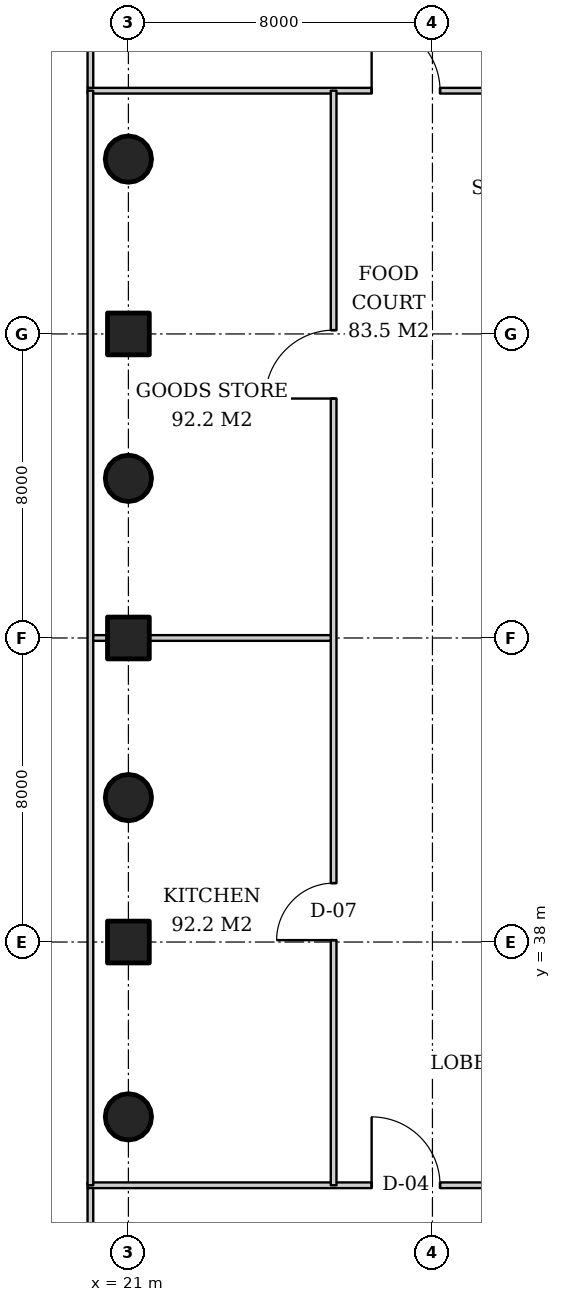
"""IFC4 building model, lengths in metres.
Left out: names, types, materials, properties, quantities, classifications, styles, units other than length and angle.
Written with IfcOpenShell. Run it as: python <this file> out.ifc"""

import sys

from ifc_helpers import new_model, si_unit, direction, frame, frame_2d, origin, origin_2d, place, context, subcontext, project, spatial, rectangle, hollow_circle, extrude, element, fill, save


model = new_model("IFC4")
c1 = context("Model", 3, precision=1e-05, world=origin(), true_north=direction((0.0, 1.0)))
c2 = subcontext(c1, "Body", "Model", "MODEL_VIEW")
j1 = project(units=[si_unit("LENGTHUNIT", "METRE"), si_unit("PLANEANGLEUNIT", "RADIAN")], contexts=[c1])
p1 = place(None, origin())
s1 = spatial("IfcSite", under=j1, at=p1, CompositionType="ELEMENT")
p2 = place(p1, origin())
s2 = spatial("IfcBuilding", under=s1, at=p2, CompositionType="ELEMENT")
p3 = place(p2, frame((0.0, 0.0, 6.0)))
s3 = spatial("IfcBuildingStorey", under=s2, at=p3, CompositionType="ELEMENT", Elevation=6.0)
for number, where, z_axis, x_axis in (
    (1, (21.0, 58.6, 0.0), (0.0, 0.0, 1.0), (1.0, 0.0, 0.0)),
    (2, (21.0, 50.2, 0.0), (0.0, 0.0, 1.0), (1.0, 0.0, 0.0)),
    (3, (21.0, 41.8, 0.0), (0.0, 0.0, 1.0), (1.0, 0.0, 0.0)),
    (4, (21.0, 33.4, 0.0), (0.0, 0.0, 1.0), (1.0, 0.0, 0.0)),
):
    element("IfcColumn", number, at=place(p3, frame(where, z_axis=z_axis, x_axis=x_axis)), inside=s3, PredefinedType="COLUMN", context=c2, shape_type="SweptSolid", body=[
        extrude(hollow_circle(Radius=0.61, WallThickness=0.04, at=origin_2d()), origin(), (0.0, 0.0, 1.0), 5.0),
    ])
for number, where, z_axis, x_axis in (
    (5, (21.0, 38.0, 0.0), (0.0, 0.0, 1.0), (1.0, 0.0, 0.0)),
    (6, (21.0, 46.0, 0.0), (0.0, 0.0, 1.0), (1.0, 0.0, 0.0)),
    (7, (21.0, 54.0, 0.0), (0.0, 0.0, 1.0), (1.0, 0.0, 0.0)),
):
    element("IfcColumn", number, at=place(p3, frame(where, z_axis=z_axis, x_axis=x_axis)), inside=s3, PredefinedType="COLUMN", context=c2, shape_type="SweptSolid", body=[
        extrude(rectangle(XDim=1.1, YDim=1.1, at=origin_2d()), origin(), (0.0, 0.0, 1.0), 5.0),
    ])
p4 = place(p3, frame((19.925, 31.6, 0.0), z_axis=(0.0, 0.0, 1.0), x_axis=(1.0, 0.0, 0.0)))
e8 = element("IfcWall", 8, at=p4, inside=s3, PredefinedType="PARTITIONING", context=c2, shape_type="SweptSolid", body=[
    extrude(rectangle(XDim=50.15, YDim=0.15, at=frame_2d((25.075, 0.0))), origin(), (0.0, 0.0, 1.0), 3.688),
])
p5 = place(p4, frame((7.475, 0.0, 0.0)))
e9 = element("IfcOpeningElement", 9, at=p5, cuts=e8, PredefinedType="OPENING", context=c2, shape_type="SweptSolid", body=[
    extrude(rectangle(XDim=1.8, YDim=2.4, at=frame_2d((0.9, 1.2))), frame((0.0, 0.085, 0.0), z_axis=(0.0, -1.0, 0.0), x_axis=(1.0, 0.0, 0.0)), (0.0, 0.0, 1.0), 0.17),
])
p6 = place(p4, frame((19.975, 0.0, 0.0)))
e10 = element("IfcOpeningElement", 10, at=p6, cuts=e8, PredefinedType="OPENING", context=c2, shape_type="SweptSolid", body=[
    extrude(rectangle(XDim=1.8, YDim=2.4, at=frame_2d((0.9, 1.2))), frame((0.0, 0.085, 0.0), z_axis=(0.0, -1.0, 0.0), x_axis=(1.0, 0.0, 0.0)), (0.0, 0.0, 1.0), 0.17),
])
p7 = place(p4, frame((28.375, 0.0, 0.0)))
e11 = element("IfcOpeningElement", 11, at=p7, cuts=e8, PredefinedType="OPENING", context=c2, shape_type="SweptSolid", body=[
    extrude(rectangle(XDim=1.8, YDim=2.4, at=frame_2d((0.9, 1.2))), frame((0.0, 0.085, 0.0), z_axis=(0.0, -1.0, 0.0), x_axis=(1.0, 0.0, 0.0)), (0.0, 0.0, 1.0), 0.17),
])
p8 = place(p4, frame((40.875, 0.0, 0.0)))
e12 = element("IfcOpeningElement", 12, at=p8, cuts=e8, PredefinedType="OPENING", context=c2, shape_type="SweptSolid", body=[
    extrude(rectangle(XDim=1.8, YDim=2.4, at=frame_2d((0.9, 1.2))), frame((0.0, 0.085, 0.0), z_axis=(0.0, -1.0, 0.0), x_axis=(1.0, 0.0, 0.0)), (0.0, 0.0, 1.0), 0.17),
])
p9 = place(p3, frame((20.0, 21.075, 0.0), z_axis=(0.0, 0.0, 1.0), x_axis=(0.0, 1.0, 0.0)))
e13 = element("IfcWall", 13, at=p9, inside=s3, PredefinedType="PARTITIONING", context=c2, shape_type="SweptSolid", body=[
    extrude(rectangle(XDim=10.45, YDim=0.15, at=frame_2d((5.225, 0.0))), origin(), (0.0, 0.0, 1.0), 3.2),
])
p10 = place(p3, frame((19.925, 60.4, 0.0), z_axis=(0.0, 0.0, 1.0), x_axis=(1.0, 0.0, 0.0)))
e14 = element("IfcWall", 14, at=p10, inside=s3, PredefinedType="PARTITIONING", context=c2, shape_type="SweptSolid", body=[
    extrude(rectangle(XDim=50.15, YDim=0.15, at=frame_2d((25.075, 0.0))), origin(), (0.0, 0.0, 1.0), 3.688),
])
p11 = place(p10, frame((7.475, 0.0, 0.0)))
e15 = element("IfcOpeningElement", 15, at=p11, cuts=e14, PredefinedType="OPENING", context=c2, shape_type="SweptSolid", body=[
    extrude(rectangle(XDim=1.8, YDim=2.4, at=frame_2d((0.9, 1.2))), frame((0.0, 0.085, 0.0), z_axis=(0.0, -1.0, 0.0), x_axis=(1.0, 0.0, 0.0)), (0.0, 0.0, 1.0), 0.17),
])
p12 = place(p10, frame((19.975, 0.0, 0.0)))
e16 = element("IfcOpeningElement", 16, at=p12, cuts=e14, PredefinedType="OPENING", context=c2, shape_type="SweptSolid", body=[
    extrude(rectangle(XDim=1.8, YDim=2.4, at=frame_2d((0.9, 1.2))), frame((0.0, 0.085, 0.0), z_axis=(0.0, -1.0, 0.0), x_axis=(1.0, 0.0, 0.0)), (0.0, 0.0, 1.0), 0.17),
])
p13 = place(p10, frame((28.375, 0.0, 0.0)))
e17 = element("IfcOpeningElement", 17, at=p13, cuts=e14, PredefinedType="OPENING", context=c2, shape_type="SweptSolid", body=[
    extrude(rectangle(XDim=1.8, YDim=2.4, at=frame_2d((0.9, 1.2))), frame((0.0, 0.085, 0.0), z_axis=(0.0, -1.0, 0.0), x_axis=(1.0, 0.0, 0.0)), (0.0, 0.0, 1.0), 0.17),
])
p14 = place(p10, frame((40.875, 0.0, 0.0)))
e18 = element("IfcOpeningElement", 18, at=p14, cuts=e14, PredefinedType="OPENING", context=c2, shape_type="SweptSolid", body=[
    extrude(rectangle(XDim=1.8, YDim=2.4, at=frame_2d((0.9, 1.2))), frame((0.0, 0.085, 0.0), z_axis=(0.0, -1.0, 0.0), x_axis=(1.0, 0.0, 0.0)), (0.0, 0.0, 1.0), 0.17),
])
p15 = place(p3, frame((20.0, 60.475, 0.0), z_axis=(0.0, 0.0, 1.0), x_axis=(0.0, 1.0, 0.0)))
e19 = element("IfcWall", 19, at=p15, inside=s3, PredefinedType="PARTITIONING", context=c2, shape_type="SweptSolid", body=[
    extrude(rectangle(XDim=10.45, YDim=0.15, at=frame_2d((5.225, 0.0))), origin(), (0.0, 0.0, 1.0), 4.7),
])
p16 = place(p3, frame((20.0, 31.6, 0.0), z_axis=(0.0, 0.0, 1.0), x_axis=(0.0, 1.0, 0.0)))
e20 = element("IfcWall", 20, at=p16, inside=s3, PredefinedType="PARTITIONING", context=c2, shape_type="SweptSolid", body=[
    extrude(rectangle(XDim=28.8, YDim=0.15, at=frame_2d((14.4, 0.0))), origin(), (0.0, 0.0, 1.0), 3.2),
])
p17 = place(p3, frame((26.4, 31.6, 0.0), z_axis=(0.0, 0.0, 1.0), x_axis=(0.0, 1.0, 0.0)))
e21 = element("IfcWall", 21, at=p17, inside=s3, PredefinedType="PARTITIONING", context=c2, shape_type="SweptSolid", body=[
    extrude(rectangle(XDim=28.8, YDim=0.15, at=frame_2d((14.4, 0.0))), origin(), (0.0, 0.0, 1.0), 3.688),
])
p18 = place(p17, frame((6.45, 0.0, 0.0)))
e22 = element("IfcOpeningElement", 22, at=p18, cuts=e21, PredefinedType="OPENING", context=c2, shape_type="SweptSolid", body=[
    extrude(rectangle(XDim=1.5, YDim=2.1, at=frame_2d((0.75, 1.05))), frame((0.0, 0.085, 0.0), z_axis=(0.0, -1.0, 0.0), x_axis=(1.0, 0.0, 0.0)), (0.0, 0.0, 1.0), 0.17),
])
p19 = place(p17, frame((20.7, 0.0, 0.0)))
e23 = element("IfcOpeningElement", 23, at=p19, cuts=e21, PredefinedType="OPENING", context=c2, shape_type="SweptSolid", body=[
    extrude(rectangle(XDim=1.8, YDim=2.4, at=frame_2d((0.9, 1.2))), frame((0.0, 0.085, 0.0), z_axis=(0.0, -1.0, 0.0), x_axis=(1.0, 0.0, 0.0)), (0.0, 0.0, 1.0), 0.17),
])
p20 = place(p3, frame((20.075, 46.0, 0.0), z_axis=(0.0, 0.0, 1.0), x_axis=(1.0, 0.0, 0.0)))
e24 = element("IfcWall", 24, at=p20, inside=s3, PredefinedType="PARTITIONING", context=c2, shape_type="SweptSolid", body=[
    extrude(rectangle(XDim=0.375, YDim=0.15, at=frame_2d((0.188, 0.0))), origin(), (0.0, 0.0, 1.0), 3.2),
])
p21 = place(p3, frame((21.55, 46.0, 0.0), z_axis=(0.0, 0.0, 1.0), x_axis=(1.0, 0.0, 0.0)))
e25 = element("IfcWall", 25, at=p21, inside=s3, PredefinedType="PARTITIONING", context=c2, shape_type="SweptSolid", body=[
    extrude(rectangle(XDim=4.775, YDim=0.15, at=frame_2d((2.387, 0.0))), origin(), (0.0, 0.0, 1.0), 4.7),
])
p22 = place(p5, origin())
e26 = element("IfcDoor", 26, at=p22, inside=s3, OperationType="DOUBLE_DOOR_SINGLE_SWING", PredefinedType="DOOR", context=c2, shape_type="SweptSolid", body=[
    extrude(rectangle(XDim=1.8, YDim=2.4, at=frame_2d((0.9, 1.2))), frame((0.0, 0.025, 0.0), z_axis=(0.0, -1.0, 0.0), x_axis=(1.0, 0.0, 0.0)), (0.0, 0.0, 1.0), 0.05),
])
fill(e9, e26)
p23 = place(p11, origin())
e27 = element("IfcDoor", 27, at=p23, inside=s3, OperationType="DOUBLE_DOOR_SINGLE_SWING", PredefinedType="DOOR", context=c2, shape_type="SweptSolid", body=[
    extrude(rectangle(XDim=1.8, YDim=2.4, at=frame_2d((0.9, 1.2))), frame((0.0, 0.025, 0.0), z_axis=(0.0, -1.0, 0.0), x_axis=(1.0, 0.0, 0.0)), (0.0, 0.0, 1.0), 0.05),
])
fill(e15, e27)
p24 = place(p18, origin())
e28 = element("IfcDoor", 28, at=p24, inside=s3, OperationType="DOUBLE_DOOR_DOUBLE_SWING", PredefinedType="DOOR", context=c2, shape_type="SweptSolid", body=[
    extrude(rectangle(XDim=1.5, YDim=2.1, at=frame_2d((0.75, 1.05))), frame((0.0, 0.025, 0.0), z_axis=(0.0, -1.0, 0.0), x_axis=(1.0, 0.0, 0.0)), (0.0, 0.0, 1.0), 0.05),
])
fill(e22, e28)
p25 = place(p19, origin())
e29 = element("IfcDoor", 29, at=p25, inside=s3, OperationType="DOUBLE_DOOR_SINGLE_SWING", PredefinedType="DOOR", context=c2, shape_type="SweptSolid", body=[
    extrude(rectangle(XDim=1.8, YDim=2.4, at=frame_2d((0.9, 1.2))), frame((0.0, 0.025, 0.0), z_axis=(0.0, -1.0, 0.0), x_axis=(1.0, 0.0, 0.0)), (0.0, 0.0, 1.0), 0.05),
])
fill(e23, e29)
save(model, sys.argv[1])
